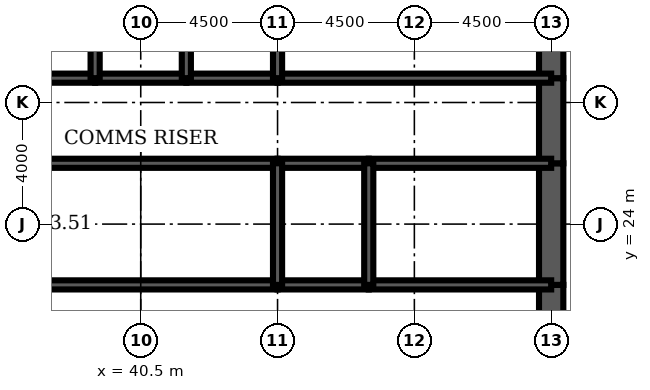
"""IFC4 building model, lengths in metres.
Left out: names, types, materials, properties, quantities, classifications, styles, units other than length and angle.
Written with IfcOpenShell. Run it as: python <this file> out.ifc"""

import sys

from ifc_helpers import new_model, si_unit, direction, frame, frame_2d, origin, place, context, subcontext, project, spatial, rectangle, extrude, element, fill, save


model = new_model("IFC4")
c1 = context("Model", 3, precision=1e-05, world=origin(), true_north=direction((0.0, 1.0)))
c2 = subcontext(c1, "Body", "Model", "MODEL_VIEW")
j1 = project(units=[si_unit("LENGTHUNIT", "METRE"), si_unit("PLANEANGLEUNIT", "RADIAN")], contexts=[c1])
p1 = place(None, origin())
s1 = spatial("IfcSite", under=j1, at=p1, CompositionType="ELEMENT")
p2 = place(p1, origin())
s2 = spatial("IfcBuilding", under=s1, at=p2, CompositionType="ELEMENT")
p3 = place(p2, frame((0.0, 0.0, 219.4)))
s3 = spatial("IfcBuildingStorey", under=s2, at=p3, CompositionType="ELEMENT", Elevation=219.4)
p4 = place(p3, frame((54.0, 19.2, 0.0), z_axis=(0.0, 0.0, 1.0), x_axis=(0.0, 1.0, 0.0)))
e1 = element("IfcWall", 1, at=p4, inside=s3, PredefinedType="SHEAR", context=c2, shape_type="SweptSolid", body=[
    extrude(rectangle(XDim=2.8, YDim=0.8, at=frame_2d((1.4, 0.0))), origin(), (0.0, 0.0, 1.0), 4.2),
])
p5 = place(p4, frame((0.4, 0.0, 0.0)))
e2 = element("IfcOpeningElement", 2, at=p5, cuts=e1, PredefinedType="OPENING", context=c2, shape_type="SweptSolid", body=[
    extrude(rectangle(XDim=1.8, YDim=2.1, at=frame_2d((0.9, 1.05))), frame((0.0, 0.41, 0.0), z_axis=(0.0, -1.0, 0.0), x_axis=(1.0, 0.0, 0.0)), (0.0, 0.0, 1.0), 0.82),
])
p6 = place(p3, frame((54.0, 22.0, 0.0), z_axis=(0.0, 0.0, 1.0), x_axis=(0.0, 1.0, 0.0)))
e3 = element("IfcWall", 3, at=p6, inside=s3, PredefinedType="SHEAR", context=c2, shape_type="SweptSolid", body=[
    extrude(rectangle(XDim=4.0, YDim=0.8, at=frame_2d((2.0, 0.0))), origin(), (0.0, 0.0, 1.0), 4.2),
])
p7 = place(p3, frame((54.0, 26.0, 0.0), z_axis=(0.0, 0.0, 1.0), x_axis=(0.0, 1.0, 0.0)))
e4 = element("IfcWall", 4, at=p7, inside=s3, PredefinedType="SHEAR", context=c2, shape_type="SweptSolid", body=[
    extrude(rectangle(XDim=2.8, YDim=0.8, at=frame_2d((1.4, 0.0))), origin(), (0.0, 0.0, 1.0), 4.2),
])
p8 = place(p7, frame((0.6, 0.0, 0.0)))
e5 = element("IfcOpeningElement", 5, at=p8, cuts=e4, PredefinedType="OPENING", context=c2, shape_type="SweptSolid", body=[
    extrude(rectangle(XDim=1.8, YDim=2.1, at=frame_2d((0.9, 1.05))), frame((0.0, 0.41, 0.0), z_axis=(0.0, -1.0, 0.0), x_axis=(1.0, 0.0, 0.0)), (0.0, 0.0, 1.0), 0.82),
])
p9 = place(p3, frame((54.0, 28.8, 0.0), z_axis=(0.0, 0.0, 1.0), x_axis=(0.0, 1.0, 0.0)))
e6 = element("IfcWall", 6, at=p9, inside=s3, PredefinedType="SHEAR", context=c2, shape_type="SweptSolid", body=[
    extrude(rectangle(XDim=3.2, YDim=0.8, at=frame_2d((1.6, 0.0))), origin(), (0.0, 0.0, 1.0), 4.2),
])
for number, where, z_axis, x_axis in (
    (7, (36.0, 28.8, 0.0), (0.0, 0.0, 1.0), (1.0, 0.0, 0.0)),
    (8, (39.0, 28.8, 0.0), (0.0, 0.0, 1.0), (1.0, 0.0, 0.0)),
):
    element("IfcWall", number, at=place(p3, frame(where, z_axis=z_axis, x_axis=x_axis)), inside=s3, PredefinedType="SOLIDWALL", context=c2, shape_type="SweptSolid", body=[
        extrude(rectangle(XDim=3.0, YDim=0.3, at=frame_2d((1.5, 0.0))), origin(), (0.0, 0.0, 1.0), 4.2),
    ])
p10 = place(p3, frame((42.0, 28.8, 0.0), z_axis=(0.0, 0.0, 1.0), x_axis=(1.0, 0.0, 0.0)))
e9 = element("IfcWall", 9, at=p10, inside=s3, PredefinedType="SOLIDWALL", context=c2, shape_type="SweptSolid", body=[
    extrude(rectangle(XDim=3.0, YDim=0.3, at=frame_2d((1.5, 0.0))), origin(), (0.0, 0.0, 1.0), 4.2),
])
p11 = place(p10, frame((0.95, 0.0, 0.0)))
e10 = element("IfcOpeningElement", 10, at=p11, cuts=e9, PredefinedType="OPENING", context=c2, shape_type="SweptSolid", body=[
    extrude(rectangle(XDim=1.1, YDim=2.2, at=frame_2d((0.55, 1.1))), frame((0.0, 0.16, 0.0), z_axis=(0.0, -1.0, 0.0), x_axis=(1.0, 0.0, 0.0)), (0.0, 0.0, 1.0), 0.32),
])
p12 = place(p3, frame((45.0, 28.8, 0.0), z_axis=(0.0, 0.0, 1.0), x_axis=(1.0, 0.0, 0.0)))
e11 = element("IfcWall", 11, at=p12, inside=s3, PredefinedType="SOLIDWALL", context=c2, shape_type="SweptSolid", body=[
    extrude(rectangle(XDim=9.0, YDim=0.3, at=frame_2d((4.5, 0.0))), origin(), (0.0, 0.0, 1.0), 4.2),
])
p13 = place(p12, frame((7.35, 0.0, 0.0)))
e12 = element("IfcOpeningElement", 12, at=p13, cuts=e11, PredefinedType="OPENING", context=c2, shape_type="SweptSolid", body=[
    extrude(rectangle(XDim=1.0, YDim=2.1, at=frame_2d((0.5, 1.05))), frame((0.0, 0.16, 0.0), z_axis=(0.0, -1.0, 0.0), x_axis=(1.0, 0.0, 0.0)), (0.0, 0.0, 1.0), 0.32),
])
p14 = place(p3, frame((36.0, 22.0, 0.0), z_axis=(0.0, 0.0, 1.0), x_axis=(1.0, 0.0, 0.0)))
e13 = element("IfcWall", 13, at=p14, inside=s3, PredefinedType="SOLIDWALL", context=c2, shape_type="SweptSolid", body=[
    extrude(rectangle(XDim=9.0, YDim=0.3, at=frame_2d((4.5, 0.0))), origin(), (0.0, 0.0, 1.0), 4.2),
])
p15 = place(p14, frame((4.0, 0.0, 0.0)))
e14 = element("IfcOpeningElement", 14, at=p15, cuts=e13, PredefinedType="OPENING", context=c2, shape_type="SweptSolid", body=[
    extrude(rectangle(XDim=1.0, YDim=2.1, at=frame_2d((0.5, 1.05))), frame((0.0, 0.16, 0.0), z_axis=(0.0, -1.0, 0.0), x_axis=(1.0, 0.0, 0.0)), (0.0, 0.0, 1.0), 0.32),
])
p16 = place(p3, frame((45.0, 22.0, 0.0), z_axis=(0.0, 0.0, 1.0), x_axis=(1.0, 0.0, 0.0)))
e15 = element("IfcWall", 15, at=p16, inside=s3, PredefinedType="SOLIDWALL", context=c2, shape_type="SweptSolid", body=[
    extrude(rectangle(XDim=3.0, YDim=0.3, at=frame_2d((1.5, 0.0))), origin(), (0.0, 0.0, 1.0), 4.2),
])
p17 = place(p16, frame((1.0, 0.0, 0.0)))
e16 = element("IfcOpeningElement", 16, at=p17, cuts=e15, PredefinedType="OPENING", context=c2, shape_type="SweptSolid", body=[
    extrude(rectangle(XDim=1.0, YDim=2.1, at=frame_2d((0.5, 1.05))), frame((0.0, 0.16, 0.0), z_axis=(0.0, -1.0, 0.0), x_axis=(1.0, 0.0, 0.0)), (0.0, 0.0, 1.0), 0.32),
])
p18 = place(p3, frame((48.0, 22.0, 0.0), z_axis=(0.0, 0.0, 1.0), x_axis=(1.0, 0.0, 0.0)))
e17 = element("IfcWall", 17, at=p18, inside=s3, PredefinedType="SOLIDWALL", context=c2, shape_type="SweptSolid", body=[
    extrude(rectangle(XDim=6.0, YDim=0.3, at=frame_2d((3.0, 0.0))), origin(), (0.0, 0.0, 1.0), 4.2),
])
p19 = place(p18, frame((2.0, 0.0, 0.0)))
e18 = element("IfcOpeningElement", 18, at=p19, cuts=e17, PredefinedType="OPENING", context=c2, shape_type="SweptSolid", body=[
    extrude(rectangle(XDim=1.0, YDim=2.1, at=frame_2d((0.5, 1.05))), frame((0.0, 0.16, 0.0), z_axis=(0.0, -1.0, 0.0), x_axis=(1.0, 0.0, 0.0)), (0.0, 0.0, 1.0), 0.32),
])
p20 = place(p18, frame((4.05, 0.0, 0.0)))
e19 = element("IfcOpeningElement", 19, at=p20, cuts=e17, PredefinedType="OPENING", context=c2, shape_type="SweptSolid", body=[
    extrude(rectangle(XDim=1.0, YDim=2.1, at=frame_2d((0.5, 1.05))), frame((0.0, 0.16, 0.0), z_axis=(0.0, -1.0, 0.0), x_axis=(1.0, 0.0, 0.0)), (0.0, 0.0, 1.0), 0.32),
])
p21 = place(p3, frame((36.0, 26.0, 0.0), z_axis=(0.0, 0.0, 1.0), x_axis=(1.0, 0.0, 0.0)))
e20 = element("IfcWall", 20, at=p21, inside=s3, PredefinedType="SOLIDWALL", context=c2, shape_type="SweptSolid", body=[
    extrude(rectangle(XDim=9.0, YDim=0.3, at=frame_2d((4.5, 0.0))), origin(), (0.0, 0.0, 1.0), 4.2),
])
p22 = place(p3, frame((45.0, 26.0, 0.0), z_axis=(0.0, 0.0, 1.0), x_axis=(1.0, 0.0, 0.0)))
e21 = element("IfcWall", 21, at=p22, inside=s3, PredefinedType="SOLIDWALL", context=c2, shape_type="SweptSolid", body=[
    extrude(rectangle(XDim=3.0, YDim=0.3, at=frame_2d((1.5, 0.0))), origin(), (0.0, 0.0, 1.0), 4.2),
])
p23 = place(p3, frame((48.0, 26.0, 0.0), z_axis=(0.0, 0.0, 1.0), x_axis=(1.0, 0.0, 0.0)))
e22 = element("IfcWall", 22, at=p23, inside=s3, PredefinedType="SOLIDWALL", context=c2, shape_type="SweptSolid", body=[
    extrude(rectangle(XDim=6.0, YDim=0.3, at=frame_2d((3.0, 0.0))), origin(), (0.0, 0.0, 1.0), 4.2),
])
for number, where, z_axis, x_axis in (
    (23, (39.0, 28.8, 0.0), (0.0, 0.0, 1.0), (0.0, 1.0, 0.0)),
    (24, (42.0, 28.8, 0.0), (0.0, 0.0, 1.0), (0.0, 1.0, 0.0)),
    (25, (45.0, 28.8, 0.0), (0.0, 0.0, 1.0), (0.0, 1.0, 0.0)),
):
    element("IfcWall", number, at=place(p3, frame(where, z_axis=z_axis, x_axis=x_axis)), inside=s3, PredefinedType="SOLIDWALL", context=c2, shape_type="SweptSolid", body=[
        extrude(rectangle(XDim=3.2, YDim=0.3, at=frame_2d((1.6, 0.0))), origin(), (0.0, 0.0, 1.0), 4.2),
    ])
for number, where, z_axis, x_axis in (
    (26, (45.0, 22.0, 0.0), (0.0, 0.0, 1.0), (0.0, 1.0, 0.0)),
    (27, (48.0, 22.0, 0.0), (0.0, 0.0, 1.0), (0.0, 1.0, 0.0)),
):
    element("IfcWall", number, at=place(p3, frame(where, z_axis=z_axis, x_axis=x_axis)), inside=s3, PredefinedType="SOLIDWALL", context=c2, shape_type="SweptSolid", body=[
        extrude(rectangle(XDim=4.0, YDim=0.3, at=frame_2d((2.0, 0.0))), origin(), (0.0, 0.0, 1.0), 4.2),
    ])
p24 = place(p3, frame((38.5, 22.15, 0.0), z_axis=(0.0, 0.0, 1.0), x_axis=(0.0, 1.0, 0.0)))
e28 = element("IfcWall", 28, at=p24, inside=s3, PredefinedType="PARTITIONING", context=c2, shape_type="SweptSolid", body=[
    extrude(rectangle(XDim=3.7, YDim=0.15, at=frame_2d((1.85, 0.0))), origin(), (0.0, 0.0, 1.0), 3.0),
])
p25 = place(p24, frame((2.2, 0.0, 0.0)))
e29 = element("IfcOpeningElement", 29, at=p25, cuts=e28, PredefinedType="OPENING", context=c2, shape_type="SweptSolid", body=[
    extrude(rectangle(XDim=1.0, YDim=2.1, at=frame_2d((0.5, 1.05))), frame((0.0, 0.085, 0.0), z_axis=(0.0, -1.0, 0.0), x_axis=(1.0, 0.0, 0.0)), (0.0, 0.0, 1.0), 0.17),
])
p26 = place(p3, frame((51.425, 22.15, 0.0), z_axis=(0.0, 0.0, 1.0), x_axis=(0.0, 1.0, 0.0)))
e30 = element("IfcWall", 30, at=p26, inside=s3, PredefinedType="PARTITIONING", context=c2, shape_type="SweptSolid", body=[
    extrude(rectangle(XDim=3.7, YDim=0.15, at=frame_2d((1.85, 0.0))), origin(), (0.0, 0.0, 1.0), 3.0),
])
p27 = place(p3, frame((46.2, 26.15, 0.0), z_axis=(0.0, 0.0, 1.0), x_axis=(0.0, 1.0, 0.0)))
e31 = element("IfcWall", 31, at=p27, inside=s3, PredefinedType="PARTITIONING", context=c2, shape_type="SweptSolid", body=[
    extrude(rectangle(XDim=2.5, YDim=0.15, at=frame_2d((1.25, 0.0))), origin(), (0.0, 0.0, 1.0), 3.0),
])
p28 = place(p27, frame((1.15, 0.0, 0.0)))
e32 = element("IfcOpeningElement", 32, at=p28, cuts=e31, PredefinedType="OPENING", context=c2, shape_type="SweptSolid", body=[
    extrude(rectangle(XDim=1.0, YDim=2.1, at=frame_2d((0.5, 1.05))), frame((0.0, 0.085, 0.0), z_axis=(0.0, -1.0, 0.0), x_axis=(1.0, 0.0, 0.0)), (0.0, 0.0, 1.0), 0.17),
])
p29 = place(p25, origin())
e33 = element("IfcDoor", 33, at=p29, inside=s3, OperationType="SINGLE_SWING_RIGHT", PredefinedType="DOOR", context=c2, shape_type="SweptSolid", body=[
    extrude(rectangle(XDim=1.0, YDim=2.1, at=frame_2d((0.5, 1.05))), frame((0.0, 0.025, 0.0), z_axis=(0.0, -1.0, 0.0), x_axis=(1.0, 0.0, 0.0)), (0.0, 0.0, 1.0), 0.05),
])
fill(e29, e33)
p30 = place(p28, origin())
e34 = element("IfcDoor", 34, at=p30, inside=s3, OperationType="SINGLE_SWING_RIGHT", PredefinedType="DOOR", context=c2, shape_type="SweptSolid", body=[
    extrude(rectangle(XDim=1.0, YDim=2.1, at=frame_2d((0.5, 1.05))), frame((0.0, 0.025, 0.0), z_axis=(0.0, -1.0, 0.0), x_axis=(1.0, 0.0, 0.0)), (0.0, 0.0, 1.0), 0.05),
])
fill(e32, e34)
p31 = place(p11, origin())
e35 = element("IfcDoor", 35, at=p31, inside=s3, OperationType="DOUBLE_DOOR_SLIDING", PredefinedType="USERDEFINED", context=c2, shape_type="SweptSolid", body=[
    extrude(rectangle(XDim=1.1, YDim=2.2, at=frame_2d((0.55, 1.1))), frame((0.0, 0.025, 0.0), z_axis=(0.0, -1.0, 0.0), x_axis=(1.0, 0.0, 0.0)), (0.0, 0.0, 1.0), 0.05),
])
fill(e10, e35)
p32 = place(p13, origin())
e36 = element("IfcDoor", 36, at=p32, inside=s3, OperationType="SINGLE_SWING_RIGHT", PredefinedType="DOOR", context=c2, shape_type="SweptSolid", body=[
    extrude(rectangle(XDim=1.0, YDim=2.1, at=frame_2d((0.5, 1.05))), frame((0.0, 0.025, 0.0), z_axis=(0.0, -1.0, 0.0), x_axis=(1.0, 0.0, 0.0)), (0.0, 0.0, 1.0), 0.05),
])
fill(e12, e36)
p33 = place(p5, origin())
e37 = element("IfcDoor", 37, at=p33, inside=s3, OperationType="SINGLE_SWING_LEFT", PredefinedType="DOOR", context=c2, shape_type="SweptSolid", body=[
    extrude(rectangle(XDim=1.8, YDim=2.1, at=frame_2d((0.9, 1.05))), frame((0.0, 0.4, 0.0), z_axis=(0.0, -1.0, 0.0), x_axis=(1.0, 0.0, 0.0)), (0.0, 0.0, 1.0), 0.8),
])
fill(e2, e37)
p34 = place(p8, origin())
e38 = element("IfcDoor", 38, at=p34, inside=s3, OperationType="SINGLE_SWING_LEFT", PredefinedType="DOOR", context=c2, shape_type="SweptSolid", body=[
    extrude(rectangle(XDim=1.8, YDim=2.1, at=frame_2d((0.9, 1.05))), frame((0.0, 0.4, 0.0), z_axis=(0.0, -1.0, 0.0), x_axis=(1.0, 0.0, 0.0)), (0.0, 0.0, 1.0), 0.8),
])
fill(e5, e38)
p35 = place(p15, origin())
e39 = element("IfcDoor", 39, at=p35, inside=s3, OperationType="SINGLE_SWING_LEFT", PredefinedType="DOOR", context=c2, shape_type="SweptSolid", body=[
    extrude(rectangle(XDim=1.0, YDim=2.1, at=frame_2d((0.5, 1.05))), frame((0.0, 0.025, 0.0), z_axis=(0.0, -1.0, 0.0), x_axis=(1.0, 0.0, 0.0)), (0.0, 0.0, 1.0), 0.05),
])
fill(e14, e39)
p36 = place(p17, origin())
e40 = element("IfcDoor", 40, at=p36, inside=s3, OperationType="SINGLE_SWING_LEFT", PredefinedType="DOOR", context=c2, shape_type="SweptSolid", body=[
    extrude(rectangle(XDim=1.0, YDim=2.1, at=frame_2d((0.5, 1.05))), frame((0.0, 0.025, 0.0), z_axis=(0.0, -1.0, 0.0), x_axis=(1.0, 0.0, 0.0)), (0.0, 0.0, 1.0), 0.05),
])
fill(e16, e40)
p37 = place(p19, origin())
e41 = element("IfcDoor", 41, at=p37, inside=s3, OperationType="SINGLE_SWING_LEFT", PredefinedType="DOOR", context=c2, shape_type="SweptSolid", body=[
    extrude(rectangle(XDim=1.0, YDim=2.1, at=frame_2d((0.5, 1.05))), frame((0.0, 0.025, 0.0), z_axis=(0.0, -1.0, 0.0), x_axis=(1.0, 0.0, 0.0)), (0.0, 0.0, 1.0), 0.05),
])
fill(e18, e41)
p38 = place(p20, origin())
e42 = element("IfcDoor", 42, at=p38, inside=s3, OperationType="SINGLE_SWING_RIGHT", PredefinedType="DOOR", context=c2, shape_type="SweptSolid", body=[
    extrude(rectangle(XDim=1.0, YDim=2.1, at=frame_2d((0.5, 1.05))), frame((0.0, 0.025, 0.0), z_axis=(0.0, -1.0, 0.0), x_axis=(1.0, 0.0, 0.0)), (0.0, 0.0, 1.0), 0.05),
])
fill(e19, e42)
save(model, sys.argv[1])
